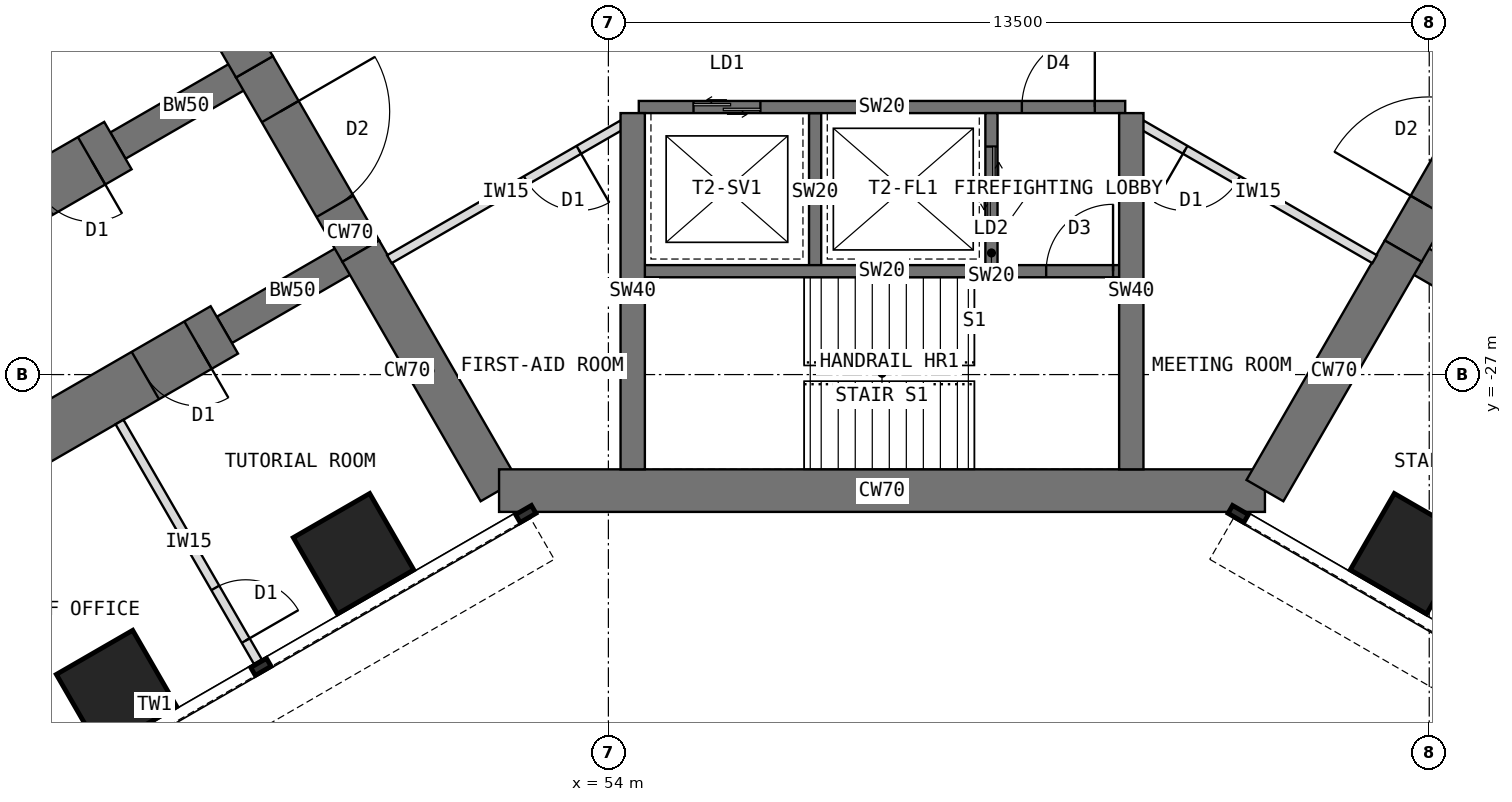
"""IFC4 building model, lengths in metres.
Left out: names, types, materials, properties, quantities, classifications, styles, units other than length and angle.
Written with IfcOpenShell. Run it as: python <this file> out.ifc"""

import sys

from ifc_helpers import new_model, si_unit, direction, frame, frame_2d, origin, origin_2d, place, context, subcontext, project, spatial, rectangle, extrude, element, fill, save


model = new_model("IFC4")
c1 = context("Model", 3, precision=1e-05, world=origin(), true_north=direction((0.0, 1.0)))
c2 = subcontext(c1, "Body", "Model", "MODEL_VIEW")
j1 = project(units=[si_unit("LENGTHUNIT", "METRE"), si_unit("PLANEANGLEUNIT", "RADIAN")], contexts=[c1])
p1 = place(None, origin())
s1 = spatial("IfcSite", under=j1, at=p1, CompositionType="ELEMENT")
p2 = place(p1, origin())
s2 = spatial("IfcBuilding", under=s1, at=p2, CompositionType="ELEMENT")
p3 = place(p2, frame((0.0, 0.0, 60.5)))
s3 = spatial("IfcBuildingStorey", under=s2, at=p3, CompositionType="ELEMENT", Elevation=60.5)
p4 = place(p3, frame((45.904, -18.0, 0.0), z_axis=(0.0, 0.0, 1.0), x_axis=(0.500024481964, -0.866011268655, 0.0)))
e1 = element("IfcWall", 1, at=p4, inside=s3, PredefinedType="SHEAR", context=c2, shape_type="SweptSolid", body=[
    extrude(rectangle(XDim=4.548, YDim=0.7, at=frame_2d((2.274, 0.0))), origin(), (0.0, 0.0, 1.0), 4.0),
])
p5 = place(p3, frame((48.178, -21.939, 0.0), z_axis=(0.0, 0.0, 1.0), x_axis=(0.500010275428, -0.866019471182, 0.0)))
e2 = element("IfcWall", 2, at=p5, inside=s3, PredefinedType="SHEAR", context=c2, shape_type="SweptSolid", body=[
    extrude(rectangle(XDim=3.5, YDim=0.7, at=frame_2d((1.75, 0.0))), origin(), (0.0, 0.0, 1.0), 4.0),
])
p6 = place(p5, frame((0.85, 0.0, 0.0)))
e3 = element("IfcOpeningElement", 3, at=p6, cuts=e2, PredefinedType="OPENING", context=c2, shape_type="SweptSolid", body=[
    extrude(rectangle(XDim=1.8, YDim=2.1, at=frame_2d((0.9, 1.05))), frame((0.0, 0.36, 0.0), z_axis=(0.0, -1.0, 0.0), x_axis=(1.0, 0.0, 0.0)), (0.0, 0.0, 1.0), 0.72),
])
p7 = place(p3, frame((49.928, -24.97, 0.0), z_axis=(0.0, 0.0, 1.0), x_axis=(0.499984222037, -0.866034513004, 0.0)))
e4 = element("IfcWall", 4, at=p7, inside=s3, PredefinedType="SHEAR", context=c2, shape_type="SweptSolid", body=[
    extrude(rectangle(XDim=4.548, YDim=0.7, at=frame_2d((2.274, 0.0))), origin(), (0.0, 0.0, 1.0), 4.0),
])
p8 = place(p3, frame((52.202, -28.908, 0.0), z_axis=(0.0, 0.0, 1.0), x_axis=(1.0, 0.0, 0.0)))
e5 = element("IfcWall", 5, at=p8, inside=s3, PredefinedType="SHEAR", context=c2, shape_type="SweptSolid", body=[
    extrude(rectangle(XDim=12.596, YDim=0.7, at=frame_2d((6.298, 0.0))), origin(), (0.0, 0.0, 1.0), 4.0),
])
p9 = place(p3, frame((64.798, -28.908, 0.0), z_axis=(0.0, 0.0, 1.0), x_axis=(0.499984222037, 0.866034513004, 0.0)))
e6 = element("IfcWall", 6, at=p9, inside=s3, PredefinedType="SHEAR", context=c2, shape_type="SweptSolid", body=[
    extrude(rectangle(XDim=4.548, YDim=0.7, at=frame_2d((2.274, 0.0))), origin(), (0.0, 0.0, 1.0), 4.0),
])
p10 = place(p3, frame((67.072, -24.97, 0.0), z_axis=(0.0, 0.0, 1.0), x_axis=(0.500010275428, 0.866019471182, 0.0)))
e7 = element("IfcWall", 7, at=p10, inside=s3, PredefinedType="SHEAR", context=c2, shape_type="SweptSolid", body=[
    extrude(rectangle(XDim=3.5, YDim=0.7, at=frame_2d((1.75, 0.0))), origin(), (0.0, 0.0, 1.0), 4.0),
])
p11 = place(p10, frame((0.85, 0.0, 0.0)))
e8 = element("IfcOpeningElement", 8, at=p11, cuts=e7, PredefinedType="OPENING", context=c2, shape_type="SweptSolid", body=[
    extrude(rectangle(XDim=1.8, YDim=2.1, at=frame_2d((0.9, 1.05))), frame((0.0, 0.36, 0.0), z_axis=(0.0, -1.0, 0.0), x_axis=(1.0, 0.0, 0.0)), (0.0, 0.0, 1.0), 0.72),
])
p12 = place(p3, frame((49.928, -24.97, 0.0), z_axis=(0.0, 0.0, 1.0), x_axis=(-0.866031863473, -0.499988811324, 0.0)))
e9 = element("IfcWall", 9, at=p12, inside=s3, PredefinedType="SHEAR", context=c2, shape_type="SweptSolid", body=[
    extrude(rectangle(XDim=2.592, YDim=0.5, at=frame_2d((1.296, 0.0))), origin(), (0.0, 0.0, 1.0), 4.0),
])
p13 = place(p3, frame((47.684, -26.266, 0.0), z_axis=(0.0, 0.0, 1.0), x_axis=(-0.866027579429, -0.499996231654, 0.0)))
e10 = element("IfcWall", 10, at=p13, inside=s3, PredefinedType="SHEAR", context=c2, shape_type="SweptSolid", body=[
    extrude(rectangle(XDim=13.2, YDim=0.9, at=frame_2d((6.6, 0.0))), origin(), (0.0, 0.0, 1.0), 4.0),
])
p14 = place(p13, frame((0.5, 0.0, 0.0)))
e11 = element("IfcOpeningElement", 11, at=p14, cuts=e10, PredefinedType="OPENING", context=c2, shape_type="SweptSolid", body=[
    extrude(rectangle(XDim=1.0, YDim=2.1, at=frame_2d((0.5, 1.05))), frame((0.0, 0.46, 0.0), z_axis=(0.0, -1.0, 0.0), x_axis=(1.0, 0.0, 0.0)), (0.0, 0.0, 1.0), 0.92),
])
p15 = place(p13, frame((7.25, 0.0, 0.0)))
e12 = element("IfcOpeningElement", 12, at=p15, cuts=e10, PredefinedType="OPENING", context=c2, shape_type="SweptSolid", body=[
    extrude(rectangle(XDim=1.0, YDim=2.1, at=frame_2d((0.5, 1.05))), frame((0.0, 0.46, 0.0), z_axis=(0.0, -1.0, 0.0), x_axis=(1.0, 0.0, 0.0)), (0.0, 0.0, 1.0), 0.92),
])
p16 = place(p3, frame((48.178, -21.939, 0.0), z_axis=(0.0, 0.0, 1.0), x_axis=(-0.866072649678, -0.499918158782, 0.0)))
e13 = element("IfcWall", 13, at=p16, inside=s3, PredefinedType="SHEAR", context=c2, shape_type="SweptSolid", body=[
    extrude(rectangle(XDim=2.592, YDim=0.5, at=frame_2d((1.296, 0.0))), origin(), (0.0, 0.0, 1.0), 4.0),
])
p17 = place(p3, frame((45.934, -23.234, 0.0), z_axis=(0.0, 0.0, 1.0), x_axis=(-0.866019570528, -0.500010103361, 0.0)))
e14 = element("IfcWall", 14, at=p17, inside=s3, PredefinedType="SHEAR", context=c2, shape_type="SweptSolid", body=[
    extrude(rectangle(XDim=13.2, YDim=0.9, at=frame_2d((6.6, 0.0))), origin(), (0.0, 0.0, 1.0), 4.0),
])
p18 = place(p17, frame((0.5, 0.0, 0.0)))
e15 = element("IfcOpeningElement", 15, at=p18, cuts=e14, PredefinedType="OPENING", context=c2, shape_type="SweptSolid", body=[
    extrude(rectangle(XDim=1.0, YDim=2.1, at=frame_2d((0.5, 1.05))), frame((0.0, 0.46, 0.0), z_axis=(0.0, -1.0, 0.0), x_axis=(1.0, 0.0, 0.0)), (0.0, 0.0, 1.0), 0.92),
])
p19 = place(p17, frame((7.25, 0.0, 0.0)))
e16 = element("IfcOpeningElement", 16, at=p19, cuts=e14, PredefinedType="OPENING", context=c2, shape_type="SweptSolid", body=[
    extrude(rectangle(XDim=1.0, YDim=2.1, at=frame_2d((0.5, 1.05))), frame((0.0, 0.46, 0.0), z_axis=(0.0, -1.0, 0.0), x_axis=(1.0, 0.0, 0.0)), (0.0, 0.0, 1.0), 0.92),
])
p20 = place(p3, frame((67.072, -24.97, 0.0), z_axis=(0.0, 0.0, 1.0), x_axis=(0.866031863473, -0.499988811324, 0.0)))
e17 = element("IfcWall", 17, at=p20, inside=s3, PredefinedType="SHEAR", context=c2, shape_type="SweptSolid", body=[
    extrude(rectangle(XDim=2.592, YDim=0.5, at=frame_2d((1.296, 0.0))), origin(), (0.0, 0.0, 1.0), 4.0),
])
for number, where, z_axis, x_axis in (
    (18, (49.809, -29.946, 0.0), (0.0, 0.0, 1.0), (0.866, 0.5, 0.0)),
    (19, (45.912, -32.196, 0.0), (0.0, 0.0, 1.0), (0.866, 0.5, 0.0)),
    (20, (67.191, -29.946, 0.0), (0.0, 0.0, 1.0), (0.5, 0.866, 0.0)),
):
    element("IfcColumn", number, at=place(p3, frame(where, z_axis=z_axis, x_axis=x_axis)), inside=s3, PredefinedType="COLUMN", context=c2, shape_type="SweptSolid", body=[
        extrude(rectangle(XDim=1.45, YDim=1.45, at=origin_2d()), origin(), (0.0, 0.0, 1.0), 4.0),
    ])
p21 = place(p3, frame((54.5, -22.6, 0.0), z_axis=(0.0, 0.0, 1.0), x_axis=(1.0, 0.0, 0.0)))
e21 = element("IfcWall", 21, at=p21, inside=s3, PredefinedType="SHEAR", context=c2, shape_type="SweptSolid", body=[
    extrude(rectangle(XDim=8.0, YDim=0.2, at=frame_2d((4.0, 0.0))), origin(), (0.0, 0.0, 1.0), 4.0),
])
p22 = place(p21, frame((6.3, 0.0, 0.0)))
e22 = element("IfcOpeningElement", 22, at=p22, cuts=e21, PredefinedType="OPENING", context=c2, shape_type="SweptSolid", body=[
    extrude(rectangle(XDim=1.2, YDim=2.1, at=frame_2d((0.6, 1.05))), frame((0.0, 0.11, 0.0), z_axis=(0.0, -1.0, 0.0), x_axis=(1.0, 0.0, 0.0)), (0.0, 0.0, 1.0), 0.22),
])
p23 = place(p21, frame((0.9, 0.0, 0.0)))
e23 = element("IfcOpeningElement", 23, at=p23, cuts=e21, PredefinedType="OPENING", context=c2, shape_type="SweptSolid", body=[
    extrude(rectangle(XDim=1.1, YDim=2.2, at=frame_2d((0.55, 1.1))), frame((0.0, 0.11, 0.0), z_axis=(0.0, -1.0, 0.0), x_axis=(1.0, 0.0, 0.0)), (0.0, 0.0, 1.0), 0.22),
])
p24 = place(p3, frame((57.4, -22.7, 0.0), z_axis=(0.0, 0.0, 1.0), x_axis=(0.0, -1.0, 0.0)))
e24 = element("IfcWall", 24, at=p24, inside=s3, PredefinedType="SHEAR", context=c2, shape_type="SweptSolid", body=[
    extrude(rectangle(XDim=2.6, YDim=0.2, at=frame_2d((1.3, 0.0))), origin(), (0.0, 0.0, 1.0), 4.0),
])
p25 = place(p3, frame((60.3, -22.7, 0.0), z_axis=(0.0, 0.0, 1.0), x_axis=(0.0, -1.0, 0.0)))
e25 = element("IfcWall", 25, at=p25, inside=s3, PredefinedType="SHEAR", context=c2, shape_type="SweptSolid", body=[
    extrude(rectangle(XDim=2.6, YDim=0.2, at=frame_2d((1.3, 0.0))), origin(), (0.0, 0.0, 1.0), 4.0),
])
p26 = place(p25, frame((0.55, 0.0, 0.0)))
e26 = element("IfcOpeningElement", 26, at=p26, cuts=e25, PredefinedType="OPENING", context=c2, shape_type="SweptSolid", body=[
    extrude(rectangle(XDim=1.3, YDim=2.2, at=frame_2d((0.65, 1.1))), frame((0.0, 0.11, 0.0), z_axis=(0.0, -1.0, 0.0), x_axis=(1.0, 0.0, 0.0)), (0.0, 0.0, 1.0), 0.22),
])
p27 = place(p3, frame((54.5, -25.3, 0.0), z_axis=(0.0, 0.0, 1.0), x_axis=(1.0, 0.0, 0.0)))
e27 = element("IfcWall", 27, at=p27, inside=s3, PredefinedType="SHEAR", context=c2, shape_type="SweptSolid", body=[
    extrude(rectangle(XDim=8.0, YDim=0.2, at=frame_2d((4.0, 0.0))), origin(), (0.0, 0.0, 1.0), 4.0),
])
p28 = place(p27, frame((6.7, 0.0, 0.0)))
e28 = element("IfcOpeningElement", 28, at=p28, cuts=e27, PredefinedType="OPENING", context=c2, shape_type="SweptSolid", body=[
    extrude(rectangle(XDim=1.1, YDim=2.1, at=frame_2d((0.55, 1.05))), frame((0.0, 0.11, 0.0), z_axis=(0.0, -1.0, 0.0), x_axis=(1.0, 0.0, 0.0)), (0.0, 0.0, 1.0), 0.22),
])
for number, where, z_axis, x_axis in (
    (29, (62.6, -22.7, 0.0), (0.0, 0.0, 1.0), (0.0, -1.0, 0.0)),
    (30, (54.4, -22.7, 0.0), (0.0, 0.0, 1.0), (0.0, -1.0, 0.0)),
):
    element("IfcWall", number, at=place(p3, frame(where, z_axis=z_axis, x_axis=x_axis)), inside=s3, PredefinedType="SHEAR", context=c2, shape_type="SweptSolid", body=[
        extrude(rectangle(XDim=5.858, YDim=0.4, at=frame_2d((2.929, 0.0))), origin(), (0.0, 0.0, 1.0), 4.0),
    ])
p29 = place(p3, frame((45.96, -27.78, 0.0), z_axis=(0.0, 0.0, 1.0), x_axis=(0.499982560684, -0.866035472144, 0.0)))
e31 = element("IfcWall", 31, at=p29, inside=s3, PredefinedType="PARTITIONING", context=c2, shape_type="SweptSolid", body=[
    extrude(rectangle(XDim=4.55, YDim=0.15, at=frame_2d((2.275, 0.0))), origin(), (0.0, 0.0, 1.0), 3.8),
])
p30 = place(p29, frame((3.15, 0.0, 0.0)))
e32 = element("IfcOpeningElement", 32, at=p30, cuts=e31, PredefinedType="OPENING", context=c2, shape_type="SweptSolid", body=[
    extrude(rectangle(XDim=1.0, YDim=2.1, at=frame_2d((0.5, 1.05))), frame((0.0, 0.085, 0.0), z_axis=(0.0, -1.0, 0.0), x_axis=(1.0, 0.0, 0.0)), (0.0, 0.0, 1.0), 0.17),
])
p31 = place(p3, frame((66.603, -25.103, 0.0), z_axis=(0.0, 0.0, 1.0), x_axis=(-0.866021148949, 0.500007369519, 0.0)))
e33 = element("IfcWall", 33, at=p31, inside=s3, PredefinedType="PARTITIONING", context=c2, shape_type="SweptSolid", body=[
    extrude(rectangle(XDim=4.426, YDim=0.15, at=frame_2d((2.213, 0.0))), origin(), (0.0, 0.0, 1.0), 3.8),
])
p32 = place(p31, frame((2.598, 0.0, 0.0)))
e34 = element("IfcOpeningElement", 34, at=p32, cuts=e33, PredefinedType="OPENING", context=c2, shape_type="SweptSolid", body=[
    extrude(rectangle(XDim=1.0, YDim=2.1, at=frame_2d((0.5, 1.05))), frame((0.0, 0.085, 0.0), z_axis=(0.0, -1.0, 0.0), x_axis=(1.0, 0.0, 0.0)), (0.0, 0.0, 1.0), 0.17),
])
p33 = place(p3, frame((54.23, -22.89, 0.0), z_axis=(0.0, 0.0, 1.0), x_axis=(-0.866021148949, -0.500007369519, 0.0)))
e35 = element("IfcWall", 35, at=p33, inside=s3, PredefinedType="PARTITIONING", context=c2, shape_type="SweptSolid", body=[
    extrude(rectangle(XDim=4.426, YDim=0.15, at=frame_2d((2.213, 0.0))), origin(), (0.0, 0.0, 1.0), 3.8),
])
p34 = place(p33, frame((0.828, 0.0, 0.0)))
e36 = element("IfcOpeningElement", 36, at=p34, cuts=e35, PredefinedType="OPENING", context=c2, shape_type="SweptSolid", body=[
    extrude(rectangle(XDim=1.0, YDim=2.1, at=frame_2d((0.5, 1.05))), frame((0.0, 0.085, 0.0), z_axis=(0.0, -1.0, 0.0), x_axis=(1.0, 0.0, 0.0)), (0.0, 0.0, 1.0), 0.17),
])
p35 = place(p22, origin())
e37 = element("IfcDoor", 37, at=p35, inside=s3, OperationType="SINGLE_SWING_RIGHT", PredefinedType="DOOR", context=c2, shape_type="SweptSolid", body=[
    extrude(rectangle(XDim=1.2, YDim=2.1, at=frame_2d((0.6, 1.05))), frame((0.0, 0.025, 0.0), z_axis=(0.0, -1.0, 0.0), x_axis=(1.0, 0.0, 0.0)), (0.0, 0.0, 1.0), 0.05),
])
fill(e22, e37)
p36 = place(p26, origin())
e38 = element("IfcDoor", 38, at=p36, inside=s3, OperationType="DOUBLE_DOOR_SLIDING", PredefinedType="DOOR", context=c2, shape_type="SweptSolid", body=[
    extrude(rectangle(XDim=1.3, YDim=2.2, at=frame_2d((0.65, 1.1))), frame((0.0, 0.025, 0.0), z_axis=(0.0, -1.0, 0.0), x_axis=(1.0, 0.0, 0.0)), (0.0, 0.0, 1.0), 0.05),
])
fill(e26, e38)
p37 = place(p23, origin())
e39 = element("IfcDoor", 39, at=p37, inside=s3, OperationType="DOUBLE_DOOR_SLIDING", PredefinedType="DOOR", context=c2, shape_type="SweptSolid", body=[
    extrude(rectangle(XDim=1.1, YDim=2.2, at=frame_2d((0.55, 1.1))), frame((0.0, 0.025, 0.0), z_axis=(0.0, -1.0, 0.0), x_axis=(1.0, 0.0, 0.0)), (0.0, 0.0, 1.0), 0.05),
])
fill(e23, e39)
p38 = place(p28, origin())
e40 = element("IfcDoor", 40, at=p38, inside=s3, OperationType="SINGLE_SWING_RIGHT", PredefinedType="DOOR", context=c2, shape_type="SweptSolid", body=[
    extrude(rectangle(XDim=1.1, YDim=2.1, at=frame_2d((0.55, 1.05))), frame((0.0, 0.025, 0.0), z_axis=(0.0, -1.0, 0.0), x_axis=(1.0, 0.0, 0.0)), (0.0, 0.0, 1.0), 0.05),
])
fill(e28, e40)
p39 = place(p6, origin())
e41 = element("IfcDoor", 41, at=p39, inside=s3, OperationType="DOUBLE_DOOR_DOUBLE_SWING", PredefinedType="DOOR", context=c2, shape_type="SweptSolid", body=[
    extrude(rectangle(XDim=1.72, YDim=2.06, at=frame_2d((0.9, 1.03))), frame((0.0, 0.025, 0.0), z_axis=(0.0, -1.0, 0.0), x_axis=(1.0, 0.0, 0.0)), (0.0, 0.0, 1.0), 0.05),
    extrude(rectangle(XDim=0.04, YDim=2.1, at=frame_2d((0.02, 1.05))), frame((0.0, 0.35, 0.0), z_axis=(0.0, -1.0, 0.0), x_axis=(1.0, 0.0, 0.0)), (0.0, 0.0, 1.0), 0.699),
    extrude(rectangle(XDim=0.04, YDim=2.1, at=frame_2d((1.78, 1.05))), frame((0.0, 0.35, 0.0), z_axis=(0.0, -1.0, 0.0), x_axis=(1.0, 0.0, 0.0)), (0.0, 0.0, 1.0), 0.699),
    extrude(rectangle(XDim=1.72, YDim=0.04, at=frame_2d((0.9, 2.08))), frame((0.0, 0.35, 0.0), z_axis=(0.0, -1.0, 0.0), x_axis=(1.0, 0.0, 0.0)), (0.0, 0.0, 1.0), 0.699),
])
fill(e3, e41)
p40 = place(p11, origin())
e42 = element("IfcDoor", 42, at=p40, inside=s3, OperationType="DOUBLE_DOOR_DOUBLE_SWING", PredefinedType="DOOR", context=c2, shape_type="SweptSolid", body=[
    extrude(rectangle(XDim=1.72, YDim=2.06, at=frame_2d((0.9, 1.03))), frame((0.0, 0.025, 0.0), z_axis=(0.0, -1.0, 0.0), x_axis=(1.0, 0.0, 0.0)), (0.0, 0.0, 1.0), 0.05),
    extrude(rectangle(XDim=0.04, YDim=2.1, at=frame_2d((0.02, 1.05))), frame((0.0, 0.35, 0.0), z_axis=(0.0, -1.0, 0.0), x_axis=(1.0, 0.0, 0.0)), (0.0, 0.0, 1.0), 0.699),
    extrude(rectangle(XDim=0.04, YDim=2.1, at=frame_2d((1.78, 1.05))), frame((0.0, 0.35, 0.0), z_axis=(0.0, -1.0, 0.0), x_axis=(1.0, 0.0, 0.0)), (0.0, 0.0, 1.0), 0.699),
    extrude(rectangle(XDim=1.72, YDim=0.04, at=frame_2d((0.9, 2.08))), frame((0.0, 0.35, 0.0), z_axis=(0.0, -1.0, 0.0), x_axis=(1.0, 0.0, 0.0)), (0.0, 0.0, 1.0), 0.699),
])
fill(e8, e42)
p41 = place(p30, origin())
e43 = element("IfcDoor", 43, at=p41, inside=s3, OperationType="SINGLE_SWING_RIGHT", PredefinedType="DOOR", context=c2, shape_type="SweptSolid", body=[
    extrude(rectangle(XDim=1.0, YDim=2.1, at=frame_2d((0.5, 1.05))), frame((0.0, 0.025, 0.0), z_axis=(0.0, -1.0, 0.0), x_axis=(1.0, 0.0, 0.0)), (0.0, 0.0, 1.0), 0.05),
])
fill(e32, e43)
p42 = place(p34, origin())
e44 = element("IfcDoor", 44, at=p42, inside=s3, OperationType="SINGLE_SWING_LEFT", PredefinedType="DOOR", context=c2, shape_type="SweptSolid", body=[
    extrude(rectangle(XDim=1.0, YDim=2.1, at=frame_2d((0.5, 1.05))), frame((0.0, 0.025, 0.0), z_axis=(0.0, -1.0, 0.0), x_axis=(1.0, 0.0, 0.0)), (0.0, 0.0, 1.0), 0.05),
])
fill(e36, e44)
p43 = place(p32, origin())
e45 = element("IfcDoor", 45, at=p43, inside=s3, OperationType="SINGLE_SWING_RIGHT", PredefinedType="DOOR", context=c2, shape_type="SweptSolid", body=[
    extrude(rectangle(XDim=1.0, YDim=2.1, at=frame_2d((0.5, 1.05))), frame((0.0, 0.025, 0.0), z_axis=(0.0, -1.0, 0.0), x_axis=(1.0, 0.0, 0.0)), (0.0, 0.0, 1.0), 0.05),
])
fill(e34, e45)
p44 = place(p14, origin())
e46 = element("IfcDoor", 46, at=p44, inside=s3, OperationType="SINGLE_SWING_LEFT", PredefinedType="DOOR", context=c2, shape_type="SweptSolid", body=[
    extrude(rectangle(XDim=0.92, YDim=2.06, at=frame_2d((0.5, 1.03))), frame((0.0, 0.025, 0.0), z_axis=(0.0, -1.0, 0.0), x_axis=(1.0, 0.0, 0.0)), (0.0, 0.0, 1.0), 0.05),
    extrude(rectangle(XDim=0.04, YDim=2.1, at=frame_2d((0.02, 1.05))), frame((0.0, 0.45, 0.0), z_axis=(0.0, -1.0, 0.0), x_axis=(1.0, 0.0, 0.0)), (0.0, 0.0, 1.0), 0.899),
    extrude(rectangle(XDim=0.04, YDim=2.1, at=frame_2d((0.98, 1.05))), frame((0.0, 0.45, 0.0), z_axis=(0.0, -1.0, 0.0), x_axis=(1.0, 0.0, 0.0)), (0.0, 0.0, 1.0), 0.899),
    extrude(rectangle(XDim=0.92, YDim=0.04, at=frame_2d((0.5, 2.08))), frame((0.0, 0.45, 0.0), z_axis=(0.0, -1.0, 0.0), x_axis=(1.0, 0.0, 0.0)), (0.0, 0.0, 1.0), 0.899),
])
fill(e11, e46)
p45 = place(p18, origin())
e47 = element("IfcDoor", 47, at=p45, inside=s3, OperationType="SINGLE_SWING_LEFT", PredefinedType="DOOR", context=c2, shape_type="SweptSolid", body=[
    extrude(rectangle(XDim=0.92, YDim=2.06, at=frame_2d((0.5, 1.03))), frame((0.0, 0.025, 0.0), z_axis=(0.0, -1.0, 0.0), x_axis=(1.0, 0.0, 0.0)), (0.0, 0.0, 1.0), 0.05),
    extrude(rectangle(XDim=0.04, YDim=2.1, at=frame_2d((0.02, 1.05))), frame((0.0, 0.45, 0.0), z_axis=(0.0, -1.0, 0.0), x_axis=(1.0, 0.0, 0.0)), (0.0, 0.0, 1.0), 0.899),
    extrude(rectangle(XDim=0.04, YDim=2.1, at=frame_2d((0.98, 1.05))), frame((0.0, 0.45, 0.0), z_axis=(0.0, -1.0, 0.0), x_axis=(1.0, 0.0, 0.0)), (0.0, 0.0, 1.0), 0.899),
    extrude(rectangle(XDim=0.92, YDim=0.04, at=frame_2d((0.5, 2.08))), frame((0.0, 0.45, 0.0), z_axis=(0.0, -1.0, 0.0), x_axis=(1.0, 0.0, 0.0)), (0.0, 0.0, 1.0), 0.899),
])
fill(e15, e47)
save(model, sys.argv[1])
